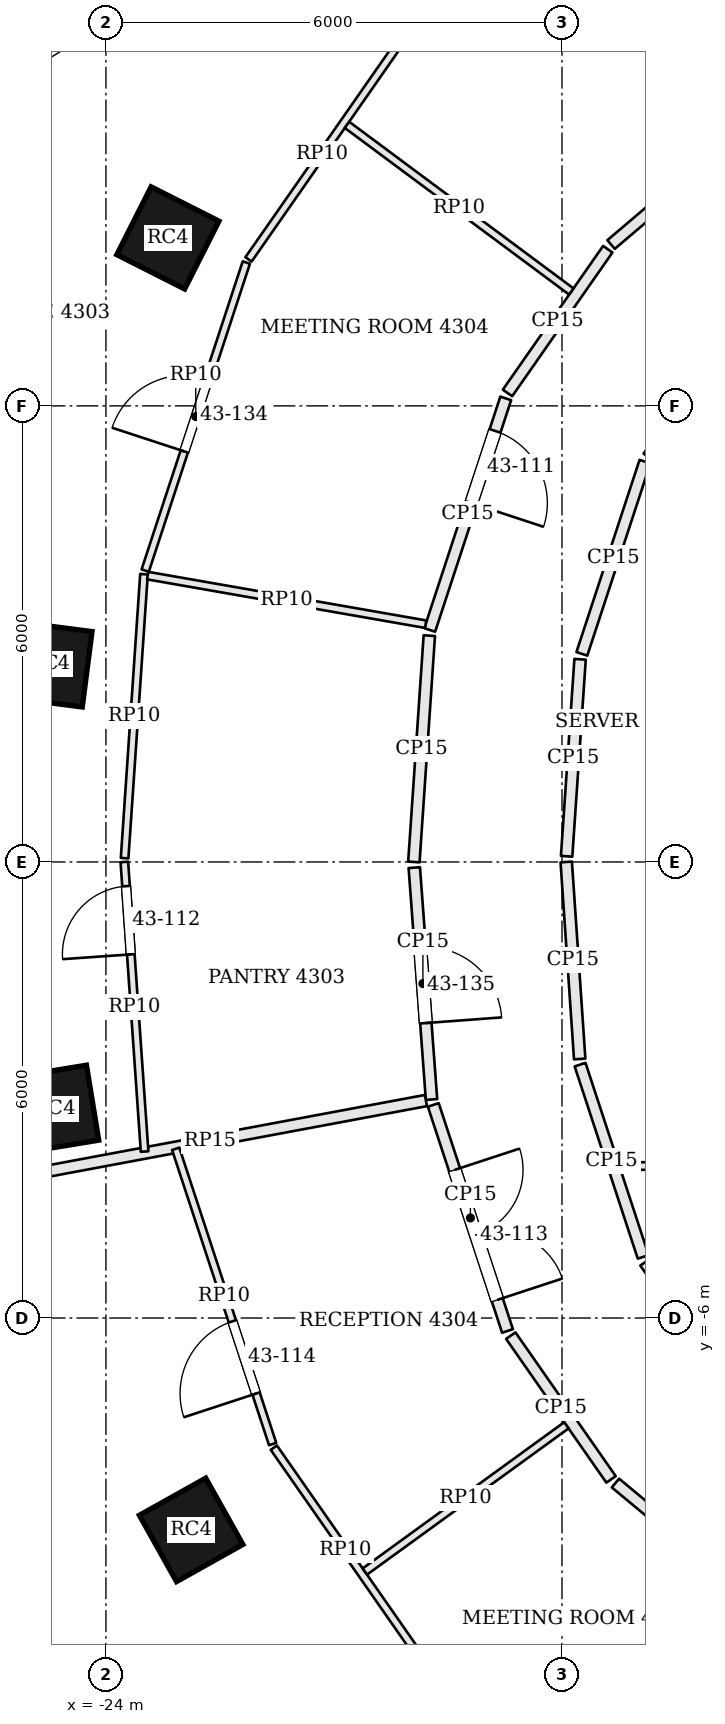
"""IFC4 building model, lengths in metres.
Left out: names, types, materials, properties, quantities, classifications, styles, units other than length and angle.
Written with IfcOpenShell. Run it as: python <this file> out.ifc"""

import sys

from ifc_helpers import new_model, si_unit, direction, frame, frame_2d, origin, origin_2d, place, context, subcontext, project, spatial, rectangle, extrude, element, fill, save


model = new_model("IFC4")
c1 = context("Model", 3, precision=1e-05, world=origin(), true_north=direction((0.0, 1.0)))
c2 = subcontext(c1, "Body", "Model", "MODEL_VIEW")
j1 = project(units=[si_unit("LENGTHUNIT", "METRE"), si_unit("PLANEANGLEUNIT", "RADIAN")], contexts=[c1])
p1 = place(None, origin())
s1 = spatial("IfcSite", under=j1, at=p1, CompositionType="ELEMENT")
p2 = place(p1, origin())
s2 = spatial("IfcBuilding", under=s1, at=p2, CompositionType="ELEMENT")
p3 = place(p2, frame((0.0, 0.0, 177.9)))
s3 = spatial("IfcBuildingStorey", under=s2, at=p3, CompositionType="ELEMENT", Elevation=177.9)
for number, where, z_axis, x_axis in (
    (1, (-23.185, 8.21, 0.0), (0.0, 0.0, 1.0), (-0.451, -0.893, 0.0)),
    (2, (-24.743, 2.599, 0.0), (0.0, 0.0, 1.0), (-0.128, -0.992, 0.0)),
    (3, (-24.669, -3.248, 0.0), (0.0, 0.0, 1.0), (0.162, -0.987, 0.0)),
    (4, (-22.879, -8.787, 0.0), (0.0, 0.0, 1.0), (0.489, -0.873, 0.0)),
):
    element("IfcColumn", number, at=place(p3, frame(where, z_axis=z_axis, x_axis=x_axis)), inside=s3, PredefinedType="COLUMN", context=c2, shape_type="SweptSolid", body=[
        extrude(rectangle(XDim=1.0, YDim=1.0, at=origin_2d()), origin(), (0.0, 0.0, 1.0), 3.9),
    ])
p4 = place(p3, frame((-23.368, 11.701, 0.0), z_axis=(0.0, 0.0, 1.0), x_axis=(-0.850251408633, -0.526376806211, 0.0)))
e5 = element("IfcWall", 5, at=p4, inside=s3, PredefinedType="SOLIDWALL", context=c2, shape_type="SweptSolid", body=[
    extrude(rectangle(XDim=5.302, YDim=0.45, at=frame_2d((2.651, 0.0))), origin(), (0.0, 0.0, 1.0), 3.7),
])
p5 = place(p4, frame((1.601, 0.0, 0.9)))
e6 = element("IfcOpeningElement", 6, at=p5, cuts=e5, PredefinedType="OPENING", context=c2, shape_type="SweptSolid", body=[
    extrude(rectangle(XDim=2.1, YDim=2.3, at=frame_2d((1.05, 1.15))), frame((0.0, 0.235, 0.0), z_axis=(0.0, -1.0, 0.0), x_axis=(1.0, 0.0, 0.0)), (0.0, 0.0, 1.0), 0.47),
])
p6 = place(p3, frame((-15.057, 10.073, 0.0), z_axis=(0.0, 0.0, 1.0), x_axis=(-0.762398905861, -0.647107339119, 0.0)))
e7 = element("IfcWall", 7, at=p6, inside=s3, PredefinedType="PARTITIONING", context=c2, shape_type="SweptSolid", body=[
    extrude(rectangle(XDim=3.013, YDim=0.15, at=frame_2d((1.507, 0.0))), origin(), (0.0, 0.0, 1.0), 3.084),
])
p7 = place(p6, frame((0.45, 0.0, 0.0)))
e8 = element("IfcOpeningElement", 8, at=p7, cuts=e7, PredefinedType="OPENING", context=c2, shape_type="SweptSolid", body=[
    extrude(rectangle(XDim=1.8, YDim=2.1, at=frame_2d((0.9, 1.05))), frame((0.0, 0.085, 0.0), z_axis=(0.0, -1.0, 0.0), x_axis=(1.0, 0.0, 0.0)), (0.0, 0.0, 1.0), 0.17),
])
p8 = place(p3, frame((-17.397, 8.062, 0.0), z_axis=(0.0, 0.0, 1.0), x_axis=(-0.572118665737, -0.820170855563, 0.0)))
e9 = element("IfcWall", 9, at=p8, inside=s3, PredefinedType="PARTITIONING", context=c2, shape_type="SweptSolid", body=[
    extrude(rectangle(XDim=2.306, YDim=0.15, at=frame_2d((1.153, 0.0))), origin(), (0.0, 0.0, 1.0), 3.084),
])
p9 = place(p3, frame((-18.74, 6.099, 0.0), z_axis=(0.0, 0.0, 1.0), x_axis=(-0.31188427026, -0.950120098706, 0.0)))
e10 = element("IfcWall", 10, at=p9, inside=s3, PredefinedType="PARTITIONING", context=c2, shape_type="SweptSolid", body=[
    extrude(rectangle(XDim=3.206, YDim=0.15, at=frame_2d((1.603, 0.0))), origin(), (0.0, 0.0, 1.0), 3.084),
])
p10 = place(p9, frame((0.45, 0.0, 0.0)))
e11 = element("IfcOpeningElement", 11, at=p10, cuts=e10, PredefinedType="OPENING", context=c2, shape_type="SweptSolid", body=[
    extrude(rectangle(XDim=1.0, YDim=2.4, at=frame_2d((0.5, 1.2))), frame((0.0, 0.085, 0.0), z_axis=(0.0, -1.0, 0.0), x_axis=(1.0, 0.0, 0.0)), (0.0, 0.0, 1.0), 0.17),
])
p11 = place(p3, frame((-19.745, 2.978, 0.0), z_axis=(0.0, 0.0, 1.0), x_axis=(-0.068142324, -0.997675610447, 0.0)))
e12 = element("IfcWall", 12, at=p11, inside=s3, PredefinedType="PARTITIONING", context=c2, shape_type="SweptSolid", body=[
    extrude(rectangle(XDim=2.984, YDim=0.15, at=frame_2d((1.492, 0.0))), origin(), (0.0, 0.0, 1.0), 3.084),
])
p12 = place(p3, frame((-19.943, -0.075, 0.0), z_axis=(0.0, 0.0, 1.0), x_axis=(0.074071611523, -0.997252924973, 0.0)))
e13 = element("IfcWall", 13, at=p12, inside=s3, PredefinedType="PARTITIONING", context=c2, shape_type="SweptSolid", body=[
    extrude(rectangle(XDim=3.059, YDim=0.15, at=frame_2d((1.529, 0.0))), origin(), (0.0, 0.0, 1.0), 3.084),
])
p13 = place(p12, frame((1.05, 0.0, 0.0)))
e14 = element("IfcOpeningElement", 14, at=p13, cuts=e13, PredefinedType="OPENING", context=c2, shape_type="SweptSolid", body=[
    extrude(rectangle(XDim=1.0, YDim=2.1, at=frame_2d((0.5, 1.05))), frame((0.0, 0.085, 0.0), z_axis=(0.0, -1.0, 0.0), x_axis=(1.0, 0.0, 0.0)), (0.0, 0.0, 1.0), 0.17),
])
p14 = place(p3, frame((-25.467, -4.199, 0.0), z_axis=(0.0, 0.0, 1.0), x_axis=(0.982998787258, 0.183612048216, 0.0)))
e15 = element("IfcWall", 15, at=p14, inside=s3, PredefinedType="PARTITIONING", context=c2, shape_type="SweptSolid", body=[
    extrude(rectangle(XDim=5.775, YDim=0.15, at=frame_2d((2.887, 0.0))), origin(), (0.0, 0.0, 1.0), 3.234),
])
p15 = place(p3, frame((-19.693, -3.196, 0.0), z_axis=(0.0, 0.0, 1.0), x_axis=(0.311918951318, -0.950108713679, 0.0)))
e16 = element("IfcWall", 16, at=p15, inside=s3, PredefinedType="PARTITIONING", context=c2, shape_type="SweptSolid", body=[
    extrude(rectangle(XDim=3.13, YDim=0.15, at=frame_2d((1.565, 0.0))), origin(), (0.0, 0.0, 1.0), 3.084),
])
p16 = place(p15, frame((0.9, 0.0, 0.0)))
e17 = element("IfcOpeningElement", 17, at=p16, cuts=e16, PredefinedType="OPENING", context=c2, shape_type="SweptSolid", body=[
    extrude(rectangle(XDim=1.8, YDim=2.1, at=frame_2d((0.9, 1.05))), frame((0.0, 0.085, 0.0), z_axis=(0.0, -1.0, 0.0), x_axis=(1.0, 0.0, 0.0)), (0.0, 0.0, 1.0), 0.17),
])
p17 = place(p3, frame((-18.674, -6.232, 0.0), z_axis=(0.0, 0.0, 1.0), x_axis=(0.572118665737, -0.820170855563, 0.0)))
e18 = element("IfcWall", 18, at=p17, inside=s3, PredefinedType="PARTITIONING", context=c2, shape_type="SweptSolid", body=[
    extrude(rectangle(XDim=2.306, YDim=0.15, at=frame_2d((1.153, 0.0))), origin(), (0.0, 0.0, 1.0), 3.084),
])
p18 = place(p3, frame((-17.297, -8.171, 0.0), z_axis=(0.0, 0.0, 1.0), x_axis=(0.769228575061, -0.638973707839, 0.0)))
e19 = element("IfcWall", 19, at=p18, inside=s3, PredefinedType="PARTITIONING", context=c2, shape_type="SweptSolid", body=[
    extrude(rectangle(XDim=3.334, YDim=0.15, at=frame_2d((1.667, 0.0))), origin(), (0.0, 0.0, 1.0), 3.084),
])
p19 = place(p18, frame((1.234, 0.0, 0.0)))
e20 = element("IfcOpeningElement", 20, at=p19, cuts=e19, PredefinedType="OPENING", context=c2, shape_type="SweptSolid", body=[
    extrude(rectangle(XDim=1.0, YDim=2.4, at=frame_2d((0.5, 1.2))), frame((0.0, 0.085, 0.0), z_axis=(0.0, -1.0, 0.0), x_axis=(1.0, 0.0, 0.0)), (0.0, 0.0, 1.0), 0.17),
])
p20 = place(p3, frame((-15.912, -6.696, 0.0), z_axis=(0.0, 0.0, 1.0), x_axis=(-0.572078533763, 0.820198848578, 0.0)))
e21 = element("IfcWall", 21, at=p20, inside=s3, PredefinedType="PARTITIONING", context=c2, shape_type="SweptSolid", body=[
    extrude(rectangle(XDim=1.742, YDim=0.15, at=frame_2d((0.871, 0.0))), origin(), (0.0, 0.0, 1.0), 3.084),
])
p21 = place(p3, frame((-16.932, -5.196, 0.0), z_axis=(0.0, 0.0, 1.0), x_axis=(-0.311904957484, 0.950113307715, 0.0)))
e22 = element("IfcWall", 22, at=p21, inside=s3, PredefinedType="PARTITIONING", context=c2, shape_type="SweptSolid", body=[
    extrude(rectangle(XDim=2.662, YDim=0.15, at=frame_2d((1.331, 0.0))), origin(), (0.0, 0.0, 1.0), 3.084),
])
p22 = place(p3, frame((-17.767, -2.592, 0.0), z_axis=(0.0, 0.0, 1.0), x_axis=(-0.068140828228, 0.997675712608, 0.0)))
e23 = element("IfcWall", 23, at=p22, inside=s3, PredefinedType="PARTITIONING", context=c2, shape_type="SweptSolid", body=[
    extrude(rectangle(XDim=2.598, YDim=0.15, at=frame_2d((1.299, 0.0))), origin(), (0.0, 0.0, 1.0), 3.084),
])
p23 = place(p3, frame((-17.939, 0.075, 0.0), z_axis=(0.0, 0.0, 1.0), x_axis=(0.068227980697, 0.997669756307, 0.0)))
e24 = element("IfcWall", 24, at=p23, inside=s3, PredefinedType="PARTITIONING", context=c2, shape_type="SweptSolid", body=[
    extrude(rectangle(XDim=2.598, YDim=0.15, at=frame_2d((1.299, 0.0))), origin(), (0.0, 0.0, 1.0), 3.084),
])
p24 = place(p3, frame((-17.739, 2.738, 0.0), z_axis=(0.0, 0.0, 1.0), x_axis=(0.311904957484, 0.950113307715, 0.0)))
e25 = element("IfcWall", 25, at=p24, inside=s3, PredefinedType="PARTITIONING", context=c2, shape_type="SweptSolid", body=[
    extrude(rectangle(XDim=2.662, YDim=0.15, at=frame_2d((1.331, 0.0))), origin(), (0.0, 0.0, 1.0), 3.084),
])
p25 = place(p3, frame((-16.865, 5.329, 0.0), z_axis=(0.0, 0.0, 1.0), x_axis=(0.572096615639, 0.820186236397, 0.0)))
e26 = element("IfcWall", 26, at=p25, inside=s3, PredefinedType="PARTITIONING", context=c2, shape_type="SweptSolid", body=[
    extrude(rectangle(XDim=1.753, YDim=0.15, at=frame_2d((0.876, 0.0))), origin(), (0.0, 0.0, 1.0), 3.084),
])
p26 = place(p3, frame((-23.491, -3.81, 0.0), z_axis=(0.0, 0.0, 1.0), x_axis=(-0.069811314636, 0.997560213896, 0.0)))
e27 = element("IfcWall", 27, at=p26, inside=s3, PredefinedType="PARTITIONING", context=c2, shape_type="SweptSolid", body=[
    extrude(rectangle(XDim=3.819, YDim=0.1, at=frame_2d((1.909, 0.0))), origin(), (0.0, 0.0, 1.0), 3.084),
])
p27 = place(p26, frame((2.6, 0.0, 0.0)))
e28 = element("IfcOpeningElement", 28, at=p27, cuts=e27, PredefinedType="OPENING", context=c2, shape_type="SweptSolid", body=[
    extrude(rectangle(XDim=0.9, YDim=2.1, at=frame_2d((0.45, 1.05))), frame((0.0, 0.06, 0.0), z_axis=(0.0, -1.0, 0.0), x_axis=(1.0, 0.0, 0.0)), (0.0, 0.0, 1.0), 0.12),
])
p28 = place(p3, frame((-23.754, 0.05, 0.0), z_axis=(0.0, 0.0, 1.0), x_axis=(0.068193493527, 0.997672114194, 0.0)))
e29 = element("IfcWall", 29, at=p28, inside=s3, PredefinedType="PARTITIONING", context=c2, shape_type="SweptSolid", body=[
    extrude(rectangle(XDim=3.745, YDim=0.1, at=frame_2d((1.873, 0.0))), origin(), (0.0, 0.0, 1.0), 3.084),
])
p29 = place(p3, frame((-23.483, 3.833, 0.0), z_axis=(0.0, 0.0, 1.0), x_axis=(0.311880220566, 0.95012142804, 0.0)))
e30 = element("IfcWall", 30, at=p29, inside=s3, PredefinedType="PARTITIONING", context=c2, shape_type="SweptSolid", body=[
    extrude(rectangle(XDim=4.265, YDim=0.1, at=frame_2d((2.133, 0.0))), origin(), (0.0, 0.0, 1.0), 3.084),
])
p30 = place(p29, frame((1.65, 0.0, 0.0)))
e31 = element("IfcOpeningElement", 31, at=p30, cuts=e30, PredefinedType="OPENING", context=c2, shape_type="SweptSolid", body=[
    extrude(rectangle(XDim=1.0, YDim=2.4, at=frame_2d((0.5, 1.2))), frame((0.0, 0.06, 0.0), z_axis=(0.0, -1.0, 0.0), x_axis=(1.0, 0.0, 0.0)), (0.0, 0.0, 1.0), 0.12),
])
p31 = place(p3, frame((-22.125, 7.927, 0.0), z_axis=(0.0, 0.0, 1.0), x_axis=(0.572100301866, 0.820183665166, 0.0)))
e32 = element("IfcWall", 32, at=p31, inside=s3, PredefinedType="PARTITIONING", context=c2, shape_type="SweptSolid", body=[
    extrude(rectangle(XDim=3.382, YDim=0.1, at=frame_2d((1.691, 0.0))), origin(), (0.0, 0.0, 1.0), 3.084),
])
p32 = place(p3, frame((-17.877, 7.505, 0.0), z_axis=(0.0, 0.0, 1.0), x_axis=(-0.802692989486, 0.596392458563, 0.0)))
e33 = element("IfcWall", 33, at=p32, inside=s3, PredefinedType="PARTITIONING", context=c2, shape_type="SweptSolid", body=[
    extrude(rectangle(XDim=3.677, YDim=0.1, at=frame_2d((1.838, 0.0))), origin(), (0.0, 0.0, 1.0), 3.084),
])
p33 = place(p3, frame((-19.794, 3.128, 0.0), z_axis=(0.0, 0.0, 1.0), x_axis=(-0.985065623684, 0.172179316518, 0.0)))
e34 = element("IfcWall", 34, at=p33, inside=s3, PredefinedType="PARTITIONING", context=c2, shape_type="SweptSolid", body=[
    extrude(rectangle(XDim=3.712, YDim=0.1, at=frame_2d((1.856, 0.0))), origin(), (0.0, 0.0, 1.0), 3.084),
])
p34 = place(p3, frame((-19.909, -10.404, 0.0), z_axis=(0.0, 0.0, 1.0), x_axis=(-0.572111951901, 0.820175538828, 0.0)))
e35 = element("IfcWall", 35, at=p34, inside=s3, PredefinedType="PARTITIONING", context=c2, shape_type="SweptSolid", body=[
    extrude(rectangle(XDim=3.29, YDim=0.1, at=frame_2d((1.645, 0.0))), origin(), (0.0, 0.0, 1.0), 3.084),
])
p35 = place(p3, frame((-21.807, -7.658, 0.0), z_axis=(0.0, 0.0, 1.0), x_axis=(-0.311924580949, 0.950106865463, 0.0)))
e36 = element("IfcWall", 36, at=p35, inside=s3, PredefinedType="PARTITIONING", context=c2, shape_type="SweptSolid", body=[
    extrude(rectangle(XDim=4.088, YDim=0.1, at=frame_2d((2.044, 0.0))), origin(), (0.0, 0.0, 1.0), 3.084),
])
p36 = place(p35, frame((0.699, 0.0, 0.0)))
e37 = element("IfcOpeningElement", 37, at=p36, cuts=e36, PredefinedType="OPENING", context=c2, shape_type="SweptSolid", body=[
    extrude(rectangle(XDim=1.0, YDim=2.1, at=frame_2d((0.5, 1.05))), frame((0.0, 0.06, 0.0), z_axis=(0.0, -1.0, 0.0), x_axis=(1.0, 0.0, 0.0)), (0.0, 0.0, 1.0), 0.12),
])
p37 = place(p3, frame((-17.942, -7.412, 0.0), z_axis=(0.0, 0.0, 1.0), x_axis=(-0.809425321456, -0.587222827372, 0.0)))
e38 = element("IfcWall", 38, at=p37, inside=s3, PredefinedType="PARTITIONING", context=c2, shape_type="SweptSolid", body=[
    extrude(rectangle(XDim=3.275, YDim=0.1, at=frame_2d((1.638, 0.0))), origin(), (0.0, 0.0, 1.0), 3.084),
])
p38 = place(p3, frame((-17.249, -4.0, 0.0), z_axis=(0.0, 0.0, 1.0), x_axis=(1.0, 0.0, 0.0)))
e39 = element("IfcWall", 39, at=p38, inside=s3, PredefinedType="PARTITIONING", context=c2, shape_type="SweptSolid", body=[
    extrude(rectangle(XDim=2.174, YDim=0.1, at=frame_2d((1.087, 0.0))), origin(), (0.0, 0.0, 1.0), 3.084),
])
p39 = place(p5, origin())
e40 = element("IfcWindow", 40, at=p39, inside=s3, PartitioningType="SINGLE_PANEL", PredefinedType="WINDOW", context=c2, shape_type="SweptSolid", body=[
    extrude(rectangle(XDim=2.1, YDim=2.3, at=frame_2d((1.05, 1.15))), frame((0.0, 0.135, 0.0), z_axis=(0.0, -1.0, 0.0), x_axis=(1.0, 0.0, 0.0)), (0.0, 0.0, 1.0), 0.06),
])
fill(e6, e40)
p40 = place(p10, origin())
e41 = element("IfcDoor", 41, at=p40, inside=s3, OperationType="SINGLE_SWING_RIGHT", PredefinedType="DOOR", context=c2, shape_type="SweptSolid", body=[
    extrude(rectangle(XDim=1.0, YDim=2.4, at=frame_2d((0.5, 1.2))), frame((0.0, 0.025, 0.0), z_axis=(0.0, -1.0, 0.0), x_axis=(1.0, 0.0, 0.0)), (0.0, 0.0, 1.0), 0.05),
])
fill(e11, e41)
p41 = place(p27, origin())
e42 = element("IfcDoor", 42, at=p41, inside=s3, OperationType="SINGLE_SWING_LEFT", PredefinedType="DOOR", context=c2, shape_type="SweptSolid", body=[
    extrude(rectangle(XDim=0.9, YDim=2.1, at=frame_2d((0.45, 1.05))), frame((0.0, 0.025, 0.0), z_axis=(0.0, -1.0, 0.0), x_axis=(1.0, 0.0, 0.0)), (0.0, 0.0, 1.0), 0.05),
])
fill(e28, e42)
p42 = place(p16, origin())
e43 = element("IfcDoor", 43, at=p42, inside=s3, OperationType="DOUBLE_DOOR_SINGLE_SWING", PredefinedType="DOOR", context=c2, shape_type="SweptSolid", body=[
    extrude(rectangle(XDim=1.8, YDim=2.1, at=frame_2d((0.9, 1.05))), frame((0.0, 0.025, 0.0), z_axis=(0.0, -1.0, 0.0), x_axis=(1.0, 0.0, 0.0)), (0.0, 0.0, 1.0), 0.05),
])
fill(e17, e43)
p43 = place(p36, origin())
e44 = element("IfcDoor", 44, at=p43, inside=s3, OperationType="SINGLE_SWING_LEFT", PredefinedType="DOOR", context=c2, shape_type="SweptSolid", body=[
    extrude(rectangle(XDim=1.0, YDim=2.1, at=frame_2d((0.5, 1.05))), frame((0.0, 0.025, 0.0), z_axis=(0.0, -1.0, 0.0), x_axis=(1.0, 0.0, 0.0)), (0.0, 0.0, 1.0), 0.05),
])
fill(e37, e44)
p44 = place(p30, origin())
e45 = element("IfcDoor", 45, at=p44, inside=s3, OperationType="SINGLE_SWING_LEFT", PredefinedType="DOOR", context=c2, shape_type="SweptSolid", body=[
    extrude(rectangle(XDim=1.0, YDim=2.4, at=frame_2d((0.5, 1.2))), frame((0.0, 0.025, 0.0), z_axis=(0.0, -1.0, 0.0), x_axis=(1.0, 0.0, 0.0)), (0.0, 0.0, 1.0), 0.05),
])
fill(e31, e45)
p45 = place(p13, origin())
e46 = element("IfcDoor", 46, at=p45, inside=s3, OperationType="SINGLE_SWING_RIGHT", PredefinedType="DOOR", context=c2, shape_type="SweptSolid", body=[
    extrude(rectangle(XDim=1.0, YDim=2.1, at=frame_2d((0.5, 1.05))), frame((0.0, 0.025, 0.0), z_axis=(0.0, -1.0, 0.0), x_axis=(1.0, 0.0, 0.0)), (0.0, 0.0, 1.0), 0.05),
])
fill(e14, e46)
save(model, sys.argv[1])
